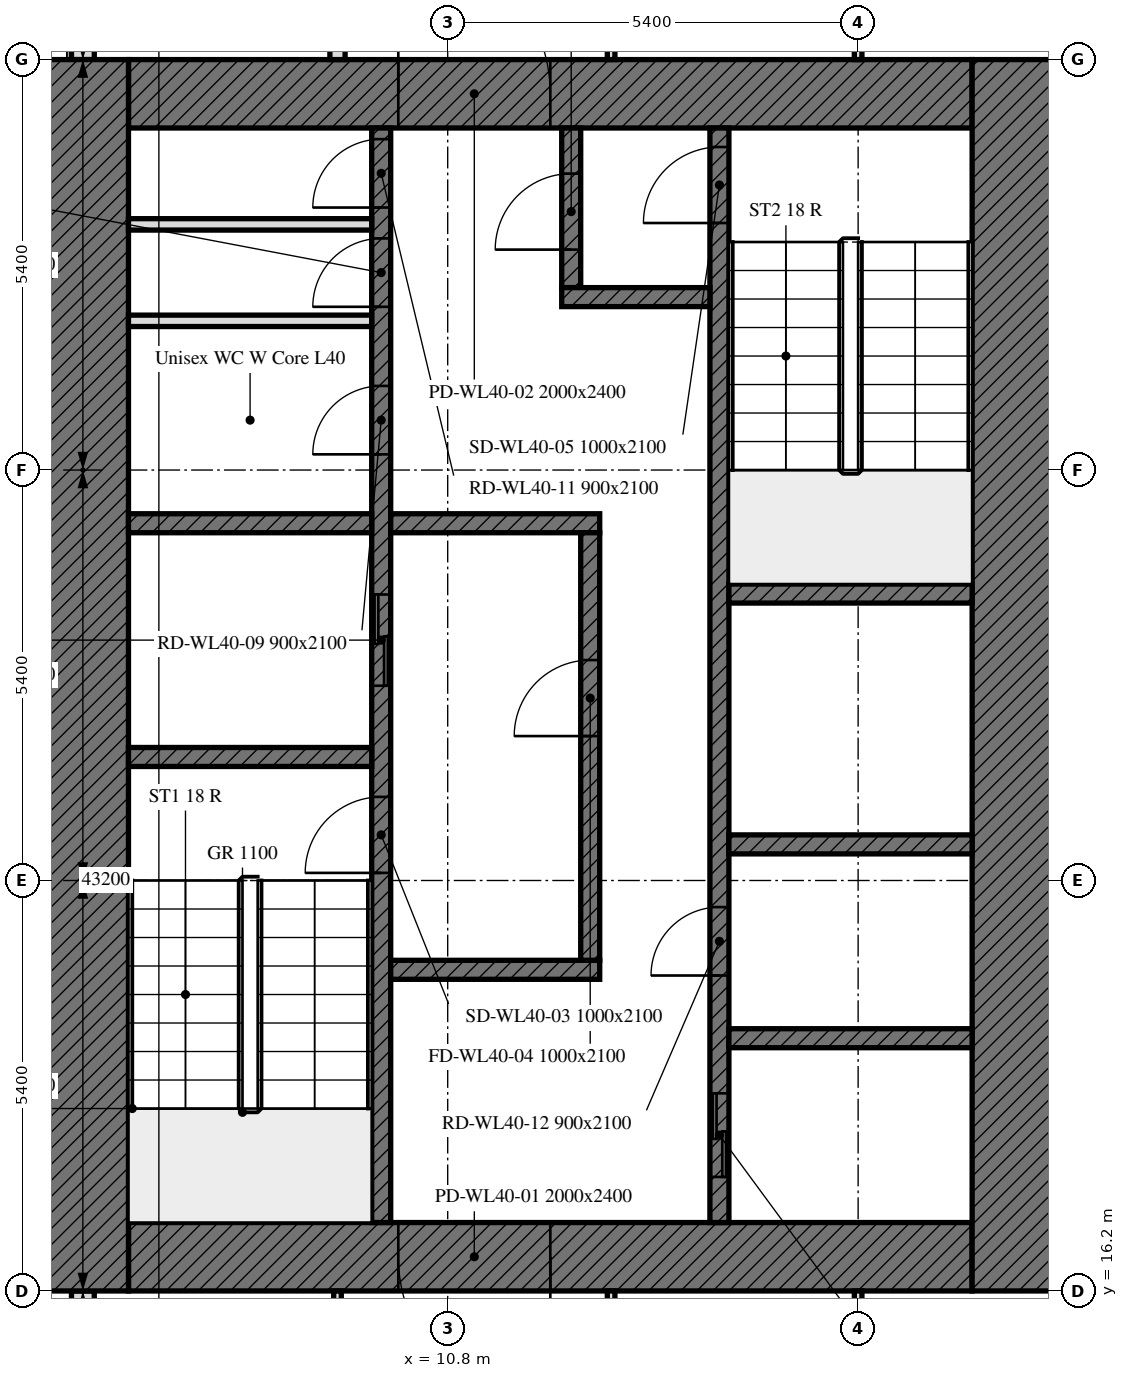
"""IFC4 building model, lengths in metres.
Left out: names, types, materials, properties, quantities, classifications, styles, units other than length and angle.
Written with IfcOpenShell. Run it as: python <this file> out.ifc"""

import sys

from ifc_helpers import new_model, si_unit, direction, frame, frame_2d, origin, place, context, subcontext, project, spatial, rectangle, extrude, element, fill, save


model = new_model("IFC4")
c1 = context("Model", 3, precision=1e-05, world=origin(), true_north=direction((0.0, 1.0)))
c2 = subcontext(c1, "Body", "Model", "MODEL_VIEW")
j1 = project(units=[si_unit("LENGTHUNIT", "METRE"), si_unit("PLANEANGLEUNIT", "RADIAN")], contexts=[c1])
p1 = place(None, origin())
s1 = spatial("IfcSite", under=j1, at=p1, CompositionType="ELEMENT")
p2 = place(p1, origin())
s2 = spatial("IfcBuilding", under=s1, at=p2, CompositionType="ELEMENT")
p3 = place(p2, frame((0.0, 0.0, 169.3)))
s3 = spatial("IfcBuildingStorey", under=s2, at=p3, CompositionType="ELEMENT", Elevation=169.3)
p4 = place(p3, frame((6.0, 37.614, 0.0), z_axis=(0.0, 0.0, 1.0), x_axis=(0.0, -1.0, 0.0)))
e1 = element("IfcWall", 1, at=p4, inside=s3, PredefinedType="SOLIDWALL", context=c2, shape_type="SweptSolid", body=[
    extrude(rectangle(XDim=5.214, YDim=0.3, at=frame_2d((2.607, 0.0))), origin(), (0.0, 0.0, 1.0), 3.0),
])
p5 = place(p4, frame((0.814, 0.0, 0.9)))
e2 = element("IfcOpeningElement", 2, at=p5, cuts=e1, PredefinedType="OPENING", context=c2, shape_type="SweptSolid", body=[
    extrude(rectangle(XDim=1.1, YDim=1.7, at=frame_2d((0.55, 0.85))), frame((0.0, 0.16, 0.0), z_axis=(0.0, -1.0, 0.0), x_axis=(1.0, 0.0, 0.0)), (0.0, 0.0, 1.0), 0.32),
])
p6 = place(p4, frame((2.764, 0.0, 0.9)))
e3 = element("IfcOpeningElement", 3, at=p6, cuts=e1, PredefinedType="OPENING", context=c2, shape_type="SweptSolid", body=[
    extrude(rectangle(XDim=1.1, YDim=1.7, at=frame_2d((0.55, 0.85))), frame((0.0, 0.16, 0.0), z_axis=(0.0, -1.0, 0.0), x_axis=(1.0, 0.0, 0.0)), (0.0, 0.0, 1.0), 0.32),
])
p7 = place(p3, frame((6.0, 16.2, 0.0), z_axis=(0.0, 0.0, 1.0), x_axis=(0.0, -1.0, 0.0)))
e4 = element("IfcWall", 4, at=p7, inside=s3, PredefinedType="SOLIDWALL", context=c2, shape_type="SweptSolid", body=[
    extrude(rectangle(XDim=10.614, YDim=0.3, at=frame_2d((5.307, 0.0))), origin(), (0.0, 0.0, 1.0), 3.0),
])
p8 = place(p7, frame((1.35, 0.0, 0.9)))
e5 = element("IfcOpeningElement", 5, at=p8, cuts=e4, PredefinedType="OPENING", context=c2, shape_type="SweptSolid", body=[
    extrude(rectangle(XDim=1.1, YDim=1.7, at=frame_2d((0.55, 0.85))), frame((0.0, 0.16, 0.0), z_axis=(0.0, -1.0, 0.0), x_axis=(1.0, 0.0, 0.0)), (0.0, 0.0, 1.0), 0.32),
])
p9 = place(p7, frame((2.95, 0.0, 0.9)))
e6 = element("IfcOpeningElement", 6, at=p9, cuts=e4, PredefinedType="OPENING", context=c2, shape_type="SweptSolid", body=[
    extrude(rectangle(XDim=1.1, YDim=1.7, at=frame_2d((0.55, 0.85))), frame((0.0, 0.16, 0.0), z_axis=(0.0, -1.0, 0.0), x_axis=(1.0, 0.0, 0.0)), (0.0, 0.0, 1.0), 0.32),
])
p10 = place(p7, frame((6.75, 0.0, 0.9)))
e7 = element("IfcOpeningElement", 7, at=p10, cuts=e4, PredefinedType="OPENING", context=c2, shape_type="SweptSolid", body=[
    extrude(rectangle(XDim=1.1, YDim=1.7, at=frame_2d((0.55, 0.85))), frame((0.0, 0.16, 0.0), z_axis=(0.0, -1.0, 0.0), x_axis=(1.0, 0.0, 0.0)), (0.0, 0.0, 1.0), 0.32),
])
p11 = place(p7, frame((8.35, 0.0, 0.9)))
e8 = element("IfcOpeningElement", 8, at=p11, cuts=e4, PredefinedType="OPENING", context=c2, shape_type="SweptSolid", body=[
    extrude(rectangle(XDim=1.1, YDim=1.7, at=frame_2d((0.55, 0.85))), frame((0.0, 0.16, 0.0), z_axis=(0.0, -1.0, 0.0), x_axis=(1.0, 0.0, 0.0)), (0.0, 0.0, 1.0), 0.32),
])
p12 = place(p3, frame((17.7, 16.65, 0.0), z_axis=(0.0, 0.0, 1.0), x_axis=(-1.0, 0.0, 0.0)))
e9 = element("IfcWall", 9, at=p12, inside=s3, PredefinedType="SOLIDWALL", context=c2, shape_type="SweptSolid", body=[
    extrude(rectangle(XDim=11.1, YDim=0.9, at=frame_2d((5.55, 0.0))), origin(), (0.0, 0.0, 1.0), 3.0),
])
p13 = place(p12, frame((5.55, 0.0, 0.0)))
e10 = element("IfcOpeningElement", 10, at=p13, cuts=e9, PredefinedType="OPENING", context=c2, shape_type="SweptSolid", body=[
    extrude(rectangle(XDim=2.0, YDim=2.4, at=frame_2d((1.0, 1.2))), frame((0.0, 0.45, 0.0), z_axis=(0.0, -1.0, 0.0), x_axis=(1.0, 0.0, 0.0)), (0.0, 0.0, 1.0), 0.9),
])
p14 = place(p3, frame((6.6, 31.95, 0.0), z_axis=(0.0, 0.0, 1.0), x_axis=(1.0, 0.0, 0.0)))
e11 = element("IfcWall", 11, at=p14, inside=s3, PredefinedType="SOLIDWALL", context=c2, shape_type="SweptSolid", body=[
    extrude(rectangle(XDim=11.1, YDim=0.9, at=frame_2d((5.55, 0.0))), origin(), (0.0, 0.0, 1.0), 3.0),
])
p15 = place(p14, frame((3.55, 0.0, 0.0)))
e12 = element("IfcOpeningElement", 12, at=p15, cuts=e11, PredefinedType="OPENING", context=c2, shape_type="SweptSolid", body=[
    extrude(rectangle(XDim=2.0, YDim=2.4, at=frame_2d((1.0, 1.2))), frame((0.0, 0.45, 0.0), z_axis=(0.0, -1.0, 0.0), x_axis=(1.0, 0.0, 0.0)), (0.0, 0.0, 1.0), 0.9),
])
for number, where, z_axis, x_axis in (
    (13, (6.0, 16.2, 0.0), (0.0, 0.0, 1.0), (0.0, 1.0, 0.0)),
    (14, (18.3, 32.4, 0.0), (0.0, 0.0, 1.0), (0.0, -1.0, 0.0)),
):
    element("IfcWall", number, at=place(p3, frame(where, z_axis=z_axis, x_axis=x_axis)), inside=s3, PredefinedType="SOLIDWALL", context=c2, shape_type="SweptSolid", body=[
        extrude(rectangle(XDim=16.2, YDim=1.2, at=frame_2d((8.1, 0.0))), origin(), (0.0, 0.0, 1.0), 3.0),
    ])
p16 = place(p3, frame((9.925, 17.1, 0.0), z_axis=(0.0, 0.0, 1.0), x_axis=(0.0, 1.0, 0.0)))
e15 = element("IfcWall", 15, at=p16, inside=s3, PredefinedType="SOLIDWALL", context=c2, shape_type="SweptSolid", body=[
    extrude(rectangle(XDim=14.4, YDim=0.25, at=frame_2d((7.2, 0.0))), origin(), (0.0, 0.0, 1.0), 3.0),
])
p17 = place(p16, frame((4.6, 0.0, 0.0)))
e16 = element("IfcOpeningElement", 16, at=p17, cuts=e15, PredefinedType="OPENING", context=c2, shape_type="SweptSolid", body=[
    extrude(rectangle(XDim=1.0, YDim=2.1, at=frame_2d((0.5, 1.05))), frame((0.0, 0.125, 0.0), z_axis=(0.0, -1.0, 0.0), x_axis=(1.0, 0.0, 0.0)), (0.0, 0.0, 1.0), 0.25),
])
p18 = place(p16, frame((7.062, 0.0, 0.0)))
e17 = element("IfcOpeningElement", 17, at=p18, cuts=e15, PredefinedType="OPENING", context=c2, shape_type="SweptSolid", body=[
    extrude(rectangle(XDim=1.2, YDim=2.1, at=frame_2d((0.6, 1.05))), frame((0.0, 0.125, 0.0), z_axis=(0.0, -1.0, 0.0), x_axis=(1.0, 0.0, 0.0)), (0.0, 0.0, 1.0), 0.25),
])
p19 = place(p16, frame((10.106, 0.0, 0.0)))
e18 = element("IfcOpeningElement", 18, at=p19, cuts=e15, PredefinedType="OPENING", context=c2, shape_type="SweptSolid", body=[
    extrude(rectangle(XDim=0.9, YDim=2.1, at=frame_2d((0.45, 1.05))), frame((0.0, 0.125, 0.0), z_axis=(0.0, -1.0, 0.0), x_axis=(1.0, 0.0, 0.0)), (0.0, 0.0, 1.0), 0.25),
])
p20 = place(p16, frame((12.048, 0.0, 0.0)))
e19 = element("IfcOpeningElement", 19, at=p20, cuts=e15, PredefinedType="OPENING", context=c2, shape_type="SweptSolid", body=[
    extrude(rectangle(XDim=0.9, YDim=2.1, at=frame_2d((0.45, 1.05))), frame((0.0, 0.125, 0.0), z_axis=(0.0, -1.0, 0.0), x_axis=(1.0, 0.0, 0.0)), (0.0, 0.0, 1.0), 0.25),
])
p21 = place(p16, frame((13.354, 0.0, 0.0)))
e20 = element("IfcOpeningElement", 20, at=p21, cuts=e15, PredefinedType="OPENING", context=c2, shape_type="SweptSolid", body=[
    extrude(rectangle(XDim=0.9, YDim=2.1, at=frame_2d((0.45, 1.05))), frame((0.0, 0.125, 0.0), z_axis=(0.0, -1.0, 0.0), x_axis=(1.0, 0.0, 0.0)), (0.0, 0.0, 1.0), 0.25),
])
p22 = place(p3, frame((14.375, 17.1, 0.0), z_axis=(0.0, 0.0, 1.0), x_axis=(0.0, 1.0, 0.0)))
e21 = element("IfcWall", 21, at=p22, inside=s3, PredefinedType="SOLIDWALL", context=c2, shape_type="SweptSolid", body=[
    extrude(rectangle(XDim=14.4, YDim=0.25, at=frame_2d((7.2, 0.0))), origin(), (0.0, 0.0, 1.0), 3.0),
])
p23 = place(p22, frame((13.15, 0.0, 0.0)))
e22 = element("IfcOpeningElement", 22, at=p23, cuts=e21, PredefinedType="OPENING", context=c2, shape_type="SweptSolid", body=[
    extrude(rectangle(XDim=1.0, YDim=2.1, at=frame_2d((0.5, 1.05))), frame((0.0, 0.125, 0.0), z_axis=(0.0, -1.0, 0.0), x_axis=(1.0, 0.0, 0.0)), (0.0, 0.0, 1.0), 0.25),
])
p24 = place(p22, frame((0.6, 0.0, 0.0)))
e23 = element("IfcOpeningElement", 23, at=p24, cuts=e21, PredefinedType="OPENING", context=c2, shape_type="SweptSolid", body=[
    extrude(rectangle(XDim=1.1, YDim=2.1, at=frame_2d((0.55, 1.05))), frame((0.0, 0.125, 0.0), z_axis=(0.0, -1.0, 0.0), x_axis=(1.0, 0.0, 0.0)), (0.0, 0.0, 1.0), 0.25),
])
p25 = place(p22, frame((3.25, 0.0, 0.0)))
e24 = element("IfcOpeningElement", 24, at=p25, cuts=e21, PredefinedType="OPENING", context=c2, shape_type="SweptSolid", body=[
    extrude(rectangle(XDim=0.9, YDim=2.1, at=frame_2d((0.45, 1.05))), frame((0.0, 0.125, 0.0), z_axis=(0.0, -1.0, 0.0), x_axis=(1.0, 0.0, 0.0)), (0.0, 0.0, 1.0), 0.25),
])
for number, where, z_axis, x_axis in (
    (25, (6.6, 23.225, 0.0), (0.0, 0.0, 1.0), (1.0, 0.0, 0.0)),
    (26, (14.5, 25.375, 0.0), (0.0, 0.0, 1.0), (1.0, 0.0, 0.0)),
    (27, (14.5, 22.075, 0.0), (0.0, 0.0, 1.0), (1.0, 0.0, 0.0)),
    (28, (6.6, 26.3, 0.0), (0.0, 0.0, 1.0), (1.0, 0.0, 0.0)),
):
    element("IfcWall", number, at=place(p3, frame(where, z_axis=z_axis, x_axis=x_axis)), inside=s3, PredefinedType="SOLIDWALL", context=c2, shape_type="SweptSolid", body=[
        extrude(rectangle(XDim=3.2, YDim=0.25, at=frame_2d((1.6, 0.0))), origin(), (0.0, 0.0, 1.0), 3.0),
    ])
for number, where, z_axis, x_axis in (
    (29, (10.05, 26.3, 0.0), (0.0, 0.0, 1.0), (1.0, 0.0, 0.0)),
    (30, (10.05, 20.425, 0.0), (0.0, 0.0, 1.0), (1.0, 0.0, 0.0)),
):
    element("IfcWall", number, at=place(p3, frame(where, z_axis=z_axis, x_axis=x_axis)), inside=s3, PredefinedType="SOLIDWALL", context=c2, shape_type="SweptSolid", body=[
        extrude(rectangle(XDim=2.75, YDim=0.25, at=frame_2d((1.375, 0.0))), origin(), (0.0, 0.0, 1.0), 3.0),
    ])
p26 = place(p3, frame((12.425, 29.4, 0.0), z_axis=(0.0, 0.0, 1.0), x_axis=(0.0, 1.0, 0.0)))
e31 = element("IfcWall", 31, at=p26, inside=s3, PredefinedType="SOLIDWALL", context=c2, shape_type="SweptSolid", body=[
    extrude(rectangle(XDim=2.1, YDim=0.25, at=frame_2d((1.05, 0.0))), origin(), (0.0, 0.0, 1.0), 3.0),
])
p27 = place(p26, frame((0.5, 0.0, 0.0)))
e32 = element("IfcOpeningElement", 32, at=p27, cuts=e31, PredefinedType="OPENING", context=c2, shape_type="SweptSolid", body=[
    extrude(rectangle(XDim=1.0, YDim=2.1, at=frame_2d((0.5, 1.05))), frame((0.0, 0.125, 0.0), z_axis=(0.0, -1.0, 0.0), x_axis=(1.0, 0.0, 0.0)), (0.0, 0.0, 1.0), 0.25),
])
p28 = place(p3, frame((12.3, 29.275, 0.0), z_axis=(0.0, 0.0, 1.0), x_axis=(1.0, 0.0, 0.0)))
e33 = element("IfcWall", 33, at=p28, inside=s3, PredefinedType="SOLIDWALL", context=c2, shape_type="SweptSolid", body=[
    extrude(rectangle(XDim=1.95, YDim=0.25, at=frame_2d((0.975, 0.0))), origin(), (0.0, 0.0, 1.0), 3.0),
])
p29 = place(p3, frame((12.675, 20.55, 0.0), z_axis=(0.0, 0.0, 1.0), x_axis=(0.0, 1.0, 0.0)))
e34 = element("IfcWall", 34, at=p29, inside=s3, PredefinedType="SOLIDWALL", context=c2, shape_type="SweptSolid", body=[
    extrude(rectangle(XDim=5.625, YDim=0.25, at=frame_2d((2.812, 0.0))), origin(), (0.0, 0.0, 1.0), 3.0),
])
p30 = place(p29, frame((2.95, 0.0, 0.0)))
e35 = element("IfcOpeningElement", 35, at=p30, cuts=e34, PredefinedType="OPENING", context=c2, shape_type="SweptSolid", body=[
    extrude(rectangle(XDim=1.0, YDim=2.1, at=frame_2d((0.5, 1.05))), frame((0.0, 0.125, 0.0), z_axis=(0.0, -1.0, 0.0), x_axis=(1.0, 0.0, 0.0)), (0.0, 0.0, 1.0), 0.25),
])
p31 = place(p3, frame((14.5, 19.525, 0.0), z_axis=(0.0, 0.0, 1.0), x_axis=(1.0, 0.0, 0.0)))
e36 = element("IfcWall", 36, at=p31, inside=s3, PredefinedType="SOLIDWALL", context=c2, shape_type="SweptSolid", body=[
    extrude(rectangle(XDim=3.2, YDim=0.25, at=frame_2d((1.6, 0.0))), origin(), (0.0, 0.0, 1.0), 3.0),
])
for number, where, z_axis, x_axis in (
    (37, (6.6, 28.963, 0.0), (0.0, 0.0, 1.0), (1.0, 0.0, 0.0)),
    (38, (6.6, 30.232, 0.0), (0.0, 0.0, 1.0), (1.0, 0.0, 0.0)),
):
    element("IfcWall", number, at=place(p3, frame(where, z_axis=z_axis, x_axis=x_axis)), inside=s3, PredefinedType="PARTITIONING", context=c2, shape_type="SweptSolid", body=[
        extrude(rectangle(XDim=3.2, YDim=0.15, at=frame_2d((1.6, 0.0))), origin(), (0.0, 0.0, 1.0), 3.0),
    ])
p32 = place(p3, frame((16.2, 35.475, 0.0), z_axis=(0.0, 0.0, 1.0), x_axis=(0.0, -1.0, 0.0)))
e39 = element("IfcWall", 39, at=p32, inside=s3, PredefinedType="PARTITIONING", context=c2, shape_type="SweptSolid", body=[
    extrude(rectangle(XDim=3.075, YDim=0.1, at=frame_2d((1.538, 0.0))), origin(), (0.0, 0.0, 1.0), 3.0),
])
p33 = place(p3, frame((9.35, 35.65, 0.0), z_axis=(0.0, 0.0, 1.0), x_axis=(0.0, -1.0, 0.0)))
e40 = element("IfcWall", 40, at=p33, inside=s3, PredefinedType="PARTITIONING", context=c2, shape_type="SweptSolid", body=[
    extrude(rectangle(XDim=3.25, YDim=0.2, at=frame_2d((1.625, 0.0))), origin(), (0.0, 0.0, 1.0), 3.0),
])
p34 = place(p3, frame((12.95, 32.4, 0.0), z_axis=(0.0, 0.0, 1.0), x_axis=(0.0, 1.0, 0.0)))
e41 = element("IfcWall", 41, at=p34, inside=s3, PredefinedType="PARTITIONING", context=c2, shape_type="SweptSolid", body=[
    extrude(rectangle(XDim=3.075, YDim=0.1, at=frame_2d((1.538, 0.0))), origin(), (0.0, 0.0, 1.0), 3.0),
])
p35 = place(p3, frame((16.2, 16.2, 0.0), z_axis=(0.0, 0.0, 1.0), x_axis=(0.0, -1.0, 0.0)))
e42 = element("IfcWall", 42, at=p35, inside=s3, PredefinedType="PARTITIONING", context=c2, shape_type="SweptSolid", body=[
    extrude(rectangle(XDim=4.955, YDim=0.1, at=frame_2d((2.478, 0.0))), origin(), (0.0, 0.0, 1.0), 2.4),
])
for number, where, z_axis, x_axis in (
    (43, (9.35, 16.2, 0.0), (0.0, 0.0, 1.0), (0.0, -1.0, 0.0)),
    (44, (12.95, 9.975, 0.0), (0.0, 0.0, 1.0), (0.0, 1.0, 0.0)),
):
    element("IfcWall", number, at=place(p3, frame(where, z_axis=z_axis, x_axis=x_axis)), inside=s3, PredefinedType="PARTITIONING", context=c2, shape_type="SweptSolid", body=[
        extrude(rectangle(XDim=6.225, YDim=0.1, at=frame_2d((3.112, 0.0))), origin(), (0.0, 0.0, 1.0), 3.0),
    ])
p36 = place(p13, origin())
e45 = element("IfcDoor", 45, at=p36, inside=s3, OperationType="DOUBLE_DOOR_SINGLE_SWING", PredefinedType="DOOR", context=c2, shape_type="SweptSolid", body=[
    extrude(rectangle(XDim=2.0, YDim=2.4, at=frame_2d((1.0, 1.2))), frame((0.0, 0.025, 0.0), z_axis=(0.0, -1.0, 0.0), x_axis=(1.0, 0.0, 0.0)), (0.0, 0.0, 1.0), 0.05),
])
fill(e10, e45)
p37 = place(p15, origin())
e46 = element("IfcDoor", 46, at=p37, inside=s3, OperationType="DOUBLE_DOOR_SINGLE_SWING", PredefinedType="DOOR", context=c2, shape_type="SweptSolid", body=[
    extrude(rectangle(XDim=2.0, YDim=2.4, at=frame_2d((1.0, 1.2))), frame((0.0, 0.025, 0.0), z_axis=(0.0, -1.0, 0.0), x_axis=(1.0, 0.0, 0.0)), (0.0, 0.0, 1.0), 0.05),
])
fill(e12, e46)
p38 = place(p17, origin())
e47 = element("IfcDoor", 47, at=p38, inside=s3, OperationType="SINGLE_SWING_LEFT", PredefinedType="DOOR", context=c2, shape_type="SweptSolid", body=[
    extrude(rectangle(XDim=1.0, YDim=2.1, at=frame_2d((0.5, 1.05))), frame((0.0, 0.025, 0.0), z_axis=(0.0, -1.0, 0.0), x_axis=(1.0, 0.0, 0.0)), (0.0, 0.0, 1.0), 0.05),
])
fill(e16, e47)
p39 = place(p30, origin())
e48 = element("IfcDoor", 48, at=p39, inside=s3, OperationType="SINGLE_SWING_LEFT", PredefinedType="DOOR", context=c2, shape_type="SweptSolid", body=[
    extrude(rectangle(XDim=1.0, YDim=2.1, at=frame_2d((0.5, 1.05))), frame((0.0, 0.025, 0.0), z_axis=(0.0, -1.0, 0.0), x_axis=(1.0, 0.0, 0.0)), (0.0, 0.0, 1.0), 0.05),
])
fill(e35, e48)
p40 = place(p23, origin())
e49 = element("IfcDoor", 49, at=p40, inside=s3, OperationType="SINGLE_SWING_LEFT", PredefinedType="DOOR", context=c2, shape_type="SweptSolid", body=[
    extrude(rectangle(XDim=1.0, YDim=2.1, at=frame_2d((0.5, 1.05))), frame((0.0, 0.025, 0.0), z_axis=(0.0, -1.0, 0.0), x_axis=(1.0, 0.0, 0.0)), (0.0, 0.0, 1.0), 0.05),
])
fill(e22, e49)
p41 = place(p27, origin())
e50 = element("IfcDoor", 50, at=p41, inside=s3, OperationType="SINGLE_SWING_LEFT", PredefinedType="DOOR", context=c2, shape_type="SweptSolid", body=[
    extrude(rectangle(XDim=1.0, YDim=2.1, at=frame_2d((0.5, 1.05))), frame((0.0, 0.025, 0.0), z_axis=(0.0, -1.0, 0.0), x_axis=(1.0, 0.0, 0.0)), (0.0, 0.0, 1.0), 0.05),
])
fill(e32, e50)
p42 = place(p18, origin())
e51 = element("IfcDoor", 51, at=p42, inside=s3, OperationType="DOUBLE_DOOR_SLIDING", PredefinedType="DOOR", context=c2, shape_type="SweptSolid", body=[
    extrude(rectangle(XDim=1.2, YDim=2.1, at=frame_2d((0.6, 1.05))), frame((0.0, 0.025, 0.0), z_axis=(0.0, -1.0, 0.0), x_axis=(1.0, 0.0, 0.0)), (0.0, 0.0, 1.0), 0.05),
])
fill(e17, e51)
p43 = place(p24, origin())
e52 = element("IfcDoor", 52, at=p43, inside=s3, OperationType="DOUBLE_DOOR_SLIDING", PredefinedType="DOOR", context=c2, shape_type="SweptSolid", body=[
    extrude(rectangle(XDim=1.1, YDim=2.1, at=frame_2d((0.55, 1.05))), frame((0.0, 0.025, 0.0), z_axis=(0.0, -1.0, 0.0), x_axis=(1.0, 0.0, 0.0)), (0.0, 0.0, 1.0), 0.05),
])
fill(e23, e52)
p44 = place(p19, origin())
e53 = element("IfcDoor", 53, at=p44, inside=s3, OperationType="SINGLE_SWING_LEFT", PredefinedType="DOOR", context=c2, shape_type="SweptSolid", body=[
    extrude(rectangle(XDim=0.9, YDim=2.1, at=frame_2d((0.45, 1.05))), frame((0.0, 0.025, 0.0), z_axis=(0.0, -1.0, 0.0), x_axis=(1.0, 0.0, 0.0)), (0.0, 0.0, 1.0), 0.05),
])
fill(e18, e53)
p45 = place(p20, origin())
e54 = element("IfcDoor", 54, at=p45, inside=s3, OperationType="SINGLE_SWING_LEFT", PredefinedType="DOOR", context=c2, shape_type="SweptSolid", body=[
    extrude(rectangle(XDim=0.9, YDim=2.1, at=frame_2d((0.45, 1.05))), frame((0.0, 0.025, 0.0), z_axis=(0.0, -1.0, 0.0), x_axis=(1.0, 0.0, 0.0)), (0.0, 0.0, 1.0), 0.05),
])
fill(e19, e54)
p46 = place(p21, origin())
e55 = element("IfcDoor", 55, at=p46, inside=s3, OperationType="SINGLE_SWING_LEFT", PredefinedType="DOOR", context=c2, shape_type="SweptSolid", body=[
    extrude(rectangle(XDim=0.9, YDim=2.1, at=frame_2d((0.45, 1.05))), frame((0.0, 0.025, 0.0), z_axis=(0.0, -1.0, 0.0), x_axis=(1.0, 0.0, 0.0)), (0.0, 0.0, 1.0), 0.05),
])
fill(e20, e55)
p47 = place(p25, origin())
e56 = element("IfcDoor", 56, at=p47, inside=s3, OperationType="SINGLE_SWING_LEFT", PredefinedType="DOOR", context=c2, shape_type="SweptSolid", body=[
    extrude(rectangle(XDim=0.9, YDim=2.1, at=frame_2d((0.45, 1.05))), frame((0.0, 0.025, 0.0), z_axis=(0.0, -1.0, 0.0), x_axis=(1.0, 0.0, 0.0)), (0.0, 0.0, 1.0), 0.05),
])
fill(e24, e56)
save(model, sys.argv[1])
